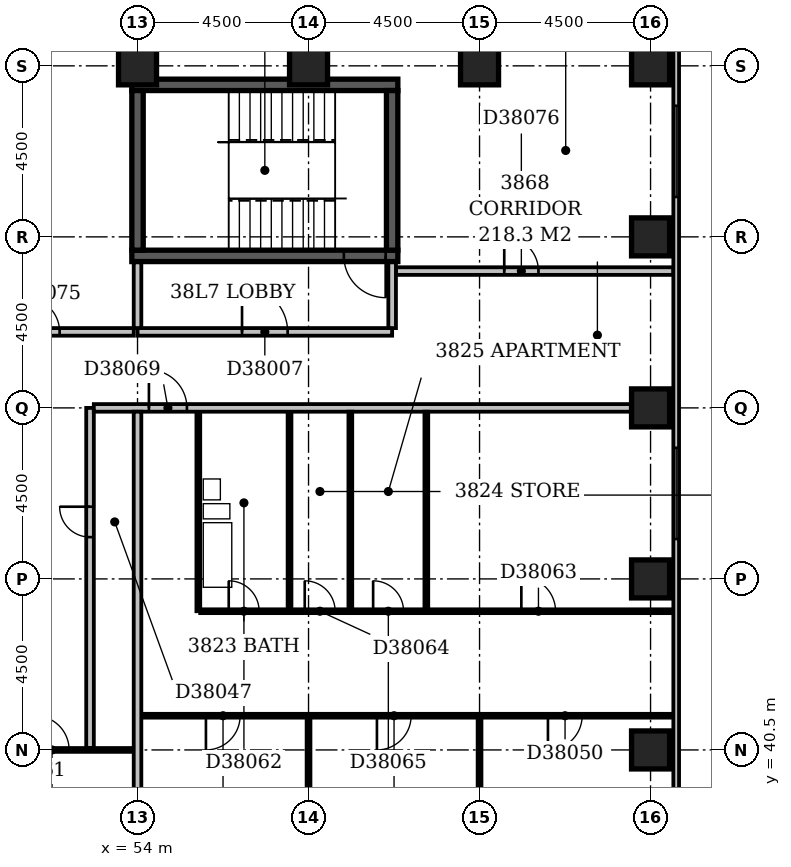
"""IFC4 building model, lengths in metres.
Left out: names, types, materials, properties, quantities, classifications, styles, units other than length and angle.
Written with IfcOpenShell. Run it as: python <this file> out.ifc"""

import sys

from ifc_helpers import new_model, si_unit, direction, frame, frame_2d, origin, origin_2d, place, context, subcontext, project, spatial, rectangle, extrude, element, fill, save


model = new_model("IFC4")
c1 = context("Model", 3, precision=1e-05, world=origin(), true_north=direction((0.0, 1.0)))
c2 = subcontext(c1, "Body", "Model", "MODEL_VIEW")
j1 = project(units=[si_unit("LENGTHUNIT", "METRE"), si_unit("PLANEANGLEUNIT", "RADIAN")], contexts=[c1])
p1 = place(None, origin())
s1 = spatial("IfcSite", under=j1, at=p1, CompositionType="ELEMENT")
p2 = place(p1, origin())
s2 = spatial("IfcBuilding", under=s1, at=p2, CompositionType="ELEMENT")
p3 = place(p2, frame((0.0, 0.0, 152.0)))
s3 = spatial("IfcBuildingStorey", under=s2, at=p3, CompositionType="ELEMENT", Elevation=152.0)
p4 = place(p3, frame((53.85, 53.5, -0.3), z_axis=(0.0, 0.0, 1.0), x_axis=(1.0, 0.0, 0.0)))
e1 = element("IfcWall", 1, at=p4, inside=s3, PredefinedType="SHEAR", context=c2, shape_type="SweptSolid", body=[
    extrude(rectangle(XDim=7.0, YDim=0.3, at=frame_2d((3.5, 0.0))), origin(), (0.0, 0.0, 1.0), 3.6),
])
p5 = place(p4, frame((5.58, 0.0, 0.3)))
e2 = element("IfcOpeningElement", 2, at=p5, cuts=e1, PredefinedType="OPENING", context=c2, shape_type="SweptSolid", body=[
    extrude(rectangle(XDim=1.1, YDim=2.1, at=frame_2d((0.55, 1.05))), frame((0.0, 0.162, 0.0), z_axis=(0.0, -1.0, 0.0), x_axis=(1.0, 0.0, 0.0)), (0.0, 0.0, 1.0), 0.324),
])
p6 = place(p3, frame((53.85, 58.0, -0.3), z_axis=(0.0, 0.0, 1.0), x_axis=(1.0, 0.0, 0.0)))
e3 = element("IfcWall", 3, at=p6, inside=s3, PredefinedType="SHEAR", context=c2, shape_type="SweptSolid", body=[
    extrude(rectangle(XDim=7.0, YDim=0.3, at=frame_2d((3.5, 0.0))), origin(), (0.0, 0.0, 1.0), 3.6),
])
for number, where, z_axis, x_axis in (
    (4, (54.0, 53.65, -0.3), (0.0, 0.0, 1.0), (0.0, 1.0, 0.0)),
    (5, (60.7, 53.65, -0.3), (0.0, 0.0, 1.0), (0.0, 1.0, 0.0)),
):
    element("IfcWall", number, at=place(p3, frame(where, z_axis=z_axis, x_axis=x_axis)), inside=s3, PredefinedType="SHEAR", context=c2, shape_type="SweptSolid", body=[
        extrude(rectangle(XDim=4.2, YDim=0.3, at=frame_2d((2.1, 0.0))), origin(), (0.0, 0.0, 1.0), 3.6),
    ])
for number, where, z_axis, x_axis in (
    (6, (67.5, 40.5, -0.3), (0.0, 0.0, 1.0), (1.0, 0.0, 0.0)),
    (7, (67.5, 45.0, -0.3), (0.0, 0.0, 1.0), (1.0, 0.0, 0.0)),
    (8, (67.5, 49.5, -0.3), (0.0, 0.0, 1.0), (1.0, 0.0, 0.0)),
    (9, (67.5, 54.0, -0.3), (0.0, 0.0, 1.0), (1.0, 0.0, 0.0)),
    (10, (54.0, 58.5, -0.3), (0.0, 0.0, 1.0), (1.0, 0.0, 0.0)),
    (11, (58.5, 58.5, -0.3), (0.0, 0.0, 1.0), (1.0, 0.0, 0.0)),
    (12, (63.0, 58.5, -0.3), (0.0, 0.0, 1.0), (1.0, 0.0, 0.0)),
    (13, (67.5, 58.5, -0.3), (0.0, 0.0, 1.0), (1.0, 0.0, 0.0)),
):
    element("IfcColumn", number, at=place(p3, frame(where, z_axis=z_axis, x_axis=x_axis)), inside=s3, PredefinedType="COLUMN", context=c2, shape_type="SweptSolid", body=[
        extrude(rectangle(XDim=1.0, YDim=1.0, at=origin_2d()), origin(), (0.0, 0.0, 1.0), 3.6),
    ])
p7 = place(p3, frame((68.175, 35.4, 0.0), z_axis=(0.0, 0.0, 1.0), x_axis=(0.0, 1.0, 0.0)))
e14 = element("IfcWall", 14, at=p7, inside=s3, PredefinedType="STANDARD", context=c2, shape_type="SweptSolid", body=[
    extrude(rectangle(XDim=23.85, YDim=0.15, at=frame_2d((11.925, 0.0))), origin(), (0.0, 0.0, 1.0), 2.7),
])
p8 = place(p7, frame((1.65, 0.0, 0.6)))
e15 = element("IfcOpeningElement", 15, at=p8, cuts=e14, PredefinedType="OPENING", context=c2, shape_type="SweptSolid", body=[
    extrude(rectangle(XDim=2.4, YDim=1.8, at=frame_2d((1.2, 0.9))), frame((0.0, 0.087, 0.0), z_axis=(0.0, -1.0, 0.0), x_axis=(1.0, 0.0, 0.0)), (0.0, 0.0, 1.0), 0.174),
])
p9 = place(p7, frame((10.65, 0.0, 0.6)))
e16 = element("IfcOpeningElement", 16, at=p9, cuts=e14, PredefinedType="OPENING", context=c2, shape_type="SweptSolid", body=[
    extrude(rectangle(XDim=2.4, YDim=1.8, at=frame_2d((1.2, 0.9))), frame((0.0, 0.087, 0.0), z_axis=(0.0, -1.0, 0.0), x_axis=(1.0, 0.0, 0.0)), (0.0, 0.0, 1.0), 0.174),
])
p10 = place(p7, frame((19.65, 0.0, 0.6)))
e17 = element("IfcOpeningElement", 17, at=p10, cuts=e14, PredefinedType="OPENING", context=c2, shape_type="SweptSolid", body=[
    extrude(rectangle(XDim=2.4, YDim=1.8, at=frame_2d((1.2, 0.9))), frame((0.0, 0.087, 0.0), z_axis=(0.0, -1.0, 0.0), x_axis=(1.0, 0.0, 0.0)), (0.0, 0.0, 1.0), 0.174),
])
p11 = place(p3, frame((54.0, 51.5, 0.0), z_axis=(0.0, 0.0, 1.0), x_axis=(1.0, 0.0, 0.0)))
e18 = element("IfcWall", 18, at=p11, inside=s3, PredefinedType="PARTITIONING", context=c2, shape_type="SweptSolid", body=[
    extrude(rectangle(XDim=6.7, YDim=0.2, at=frame_2d((3.35, 0.0))), origin(), (0.0, 0.0, 1.0), 3.3),
])
p12 = place(p11, frame((2.75, 0.0, 0.0)))
e19 = element("IfcOpeningElement", 19, at=p12, cuts=e18, PredefinedType="OPENING", context=c2, shape_type="SweptSolid", body=[
    extrude(rectangle(XDim=1.2, YDim=2.1, at=frame_2d((0.6, 1.05))), frame((0.0, 0.112, 0.0), z_axis=(0.0, -1.0, 0.0), x_axis=(1.0, 0.0, 0.0)), (0.0, 0.0, 1.0), 0.224),
])
p13 = place(p3, frame((60.7, 51.6, 0.0), z_axis=(0.0, 0.0, 1.0), x_axis=(0.0, 1.0, 0.0)))
e20 = element("IfcWall", 20, at=p13, inside=s3, PredefinedType="PARTITIONING", context=c2, shape_type="SweptSolid", body=[
    extrude(rectangle(XDim=1.73, YDim=0.2, at=frame_2d((0.865, 0.0))), origin(), (0.0, 0.0, 1.0), 3.3),
])
p14 = place(p3, frame((54.0, 51.6, 0.0), z_axis=(0.0, 0.0, 1.0), x_axis=(0.0, 1.0, 0.0)))
e21 = element("IfcWall", 21, at=p14, inside=s3, PredefinedType="PARTITIONING", context=c2, shape_type="SweptSolid", body=[
    extrude(rectangle(XDim=1.73, YDim=0.2, at=frame_2d((0.865, 0.0))), origin(), (0.0, 0.0, 1.0), 2.6),
])
p15 = place(p3, frame((54.0, 36.5, 0.0), z_axis=(0.0, 0.0, 1.0), x_axis=(0.0, 1.0, 0.0)))
e22 = element("IfcWall", 22, at=p15, inside=s3, PredefinedType="PARTITIONING", context=c2, shape_type="SweptSolid", body=[
    extrude(rectangle(XDim=12.9, YDim=0.2, at=frame_2d((6.45, 0.0))), origin(), (0.0, 0.0, 1.0), 2.6),
])
p16 = place(p3, frame((58.5, 36.5, 0.0), z_axis=(0.0, 0.0, 1.0), x_axis=(0.0, 1.0, 0.0)))
e23 = element("IfcWall", 23, at=p16, inside=s3, PredefinedType="PARTITIONING", context=c2, shape_type="SweptSolid", body=[
    extrude(rectangle(XDim=4.85, YDim=0.1, at=frame_2d((2.425, 0.0))), origin(), (0.0, 0.0, 1.0), 3.3),
])
p17 = place(p3, frame((63.0, 36.5, 0.0), z_axis=(0.0, 0.0, 1.0), x_axis=(0.0, 1.0, 0.0)))
e24 = element("IfcWall", 24, at=p17, inside=s3, PredefinedType="PARTITIONING", context=c2, shape_type="SweptSolid", body=[
    extrude(rectangle(XDim=4.85, YDim=0.1, at=frame_2d((2.425, 0.0))), origin(), (0.0, 0.0, 1.0), 2.4),
])
p18 = place(p3, frame((49.6, 40.5, 0.0), z_axis=(0.0, 0.0, 1.0), x_axis=(1.0, 0.0, 0.0)))
e25 = element("IfcWall", 25, at=p18, inside=s3, PredefinedType="PARTITIONING", context=c2, shape_type="SweptSolid", body=[
    extrude(rectangle(XDim=4.3, YDim=0.1, at=frame_2d((2.15, 0.0))), origin(), (0.0, 0.0, 1.0), 3.3),
])
p19 = place(p18, frame((1.7, 0.0, 0.0)))
e26 = element("IfcOpeningElement", 26, at=p19, cuts=e25, PredefinedType="OPENING", context=c2, shape_type="SweptSolid", body=[
    extrude(rectangle(XDim=0.9, YDim=2.1, at=frame_2d((0.45, 1.05))), frame((0.0, 0.062, 0.0), z_axis=(0.0, -1.0, 0.0), x_axis=(1.0, 0.0, 0.0)), (0.0, 0.0, 1.0), 0.124),
])
p20 = place(p3, frame((52.75, 40.55, 0.0), z_axis=(0.0, 0.0, 1.0), x_axis=(0.0, 1.0, 0.0)))
e27 = element("IfcWall", 27, at=p20, inside=s3, PredefinedType="PARTITIONING", context=c2, shape_type="SweptSolid", body=[
    extrude(rectangle(XDim=8.95, YDim=0.2, at=frame_2d((4.475, 0.0))), origin(), (0.0, 0.0, 1.0), 3.3),
])
p21 = place(p20, frame((5.55, 0.0, 0.0)))
e28 = element("IfcOpeningElement", 28, at=p21, cuts=e27, PredefinedType="OPENING", context=c2, shape_type="SweptSolid", body=[
    extrude(rectangle(XDim=0.8, YDim=2.1, at=frame_2d((0.4, 1.05))), frame((0.0, 0.112, 0.0), z_axis=(0.0, -1.0, 0.0), x_axis=(1.0, 0.0, 0.0)), (0.0, 0.0, 1.0), 0.224),
])
p22 = place(p3, frame((54.1, 41.4, 0.0), z_axis=(0.0, 0.0, 1.0), x_axis=(1.0, 0.0, 0.0)))
e29 = element("IfcWall", 29, at=p22, inside=s3, PredefinedType="PARTITIONING", context=c2, shape_type="SweptSolid", body=[
    extrude(rectangle(XDim=14.0, YDim=0.1, at=frame_2d((7.0, 0.0))), origin(), (0.0, 0.0, 1.0), 3.3),
])
p23 = place(p22, frame((1.7, 0.0, 0.0)))
e30 = element("IfcOpeningElement", 30, at=p23, cuts=e29, PredefinedType="OPENING", context=c2, shape_type="SweptSolid", body=[
    extrude(rectangle(XDim=0.9, YDim=2.1, at=frame_2d((0.45, 1.05))), frame((0.0, 0.062, 0.0), z_axis=(0.0, -1.0, 0.0), x_axis=(1.0, 0.0, 0.0)), (0.0, 0.0, 1.0), 0.124),
])
p24 = place(p22, frame((6.2, 0.0, 0.0)))
e31 = element("IfcOpeningElement", 31, at=p24, cuts=e29, PredefinedType="OPENING", context=c2, shape_type="SweptSolid", body=[
    extrude(rectangle(XDim=0.9, YDim=2.1, at=frame_2d((0.45, 1.05))), frame((0.0, 0.062, 0.0), z_axis=(0.0, -1.0, 0.0), x_axis=(1.0, 0.0, 0.0)), (0.0, 0.0, 1.0), 0.124),
])
p25 = place(p22, frame((10.7, 0.0, 0.0)))
e32 = element("IfcOpeningElement", 32, at=p25, cuts=e29, PredefinedType="OPENING", context=c2, shape_type="SweptSolid", body=[
    extrude(rectangle(XDim=0.9, YDim=2.1, at=frame_2d((0.45, 1.05))), frame((0.0, 0.062, 0.0), z_axis=(0.0, -1.0, 0.0), x_axis=(1.0, 0.0, 0.0)), (0.0, 0.0, 1.0), 0.124),
])
p26 = place(p3, frame((55.6, 44.15, 0.0), z_axis=(0.0, 0.0, 1.0), x_axis=(0.0, 1.0, 0.0)))
e33 = element("IfcWall", 33, at=p26, inside=s3, PredefinedType="PLUMBINGWALL", context=c2, shape_type="SweptSolid", body=[
    extrude(rectangle(XDim=5.25, YDim=0.1, at=frame_2d((2.625, 0.0))), origin(), (0.0, 0.0, 1.0), 3.3),
])
p27 = place(p3, frame((55.65, 44.15, 0.0), z_axis=(0.0, 0.0, 1.0), x_axis=(1.0, 0.0, 0.0)))
e34 = element("IfcWall", 34, at=p27, inside=s3, PredefinedType="PARTITIONING", context=c2, shape_type="SweptSolid", body=[
    extrude(rectangle(XDim=12.45, YDim=0.1, at=frame_2d((6.225, 0.0))), origin(), (0.0, 0.0, 1.0), 3.3),
])
p28 = place(p27, frame((0.75, 0.0, 0.0)))
e35 = element("IfcOpeningElement", 35, at=p28, cuts=e34, PredefinedType="OPENING", context=c2, shape_type="SweptSolid", body=[
    extrude(rectangle(XDim=0.8, YDim=2.1, at=frame_2d((0.4, 1.05))), frame((0.0, 0.062, 0.0), z_axis=(0.0, -1.0, 0.0), x_axis=(1.0, 0.0, 0.0)), (0.0, 0.0, 1.0), 0.124),
])
p29 = place(p27, frame((8.45, 0.0, 0.0)))
e36 = element("IfcOpeningElement", 36, at=p29, cuts=e34, PredefinedType="OPENING", context=c2, shape_type="SweptSolid", body=[
    extrude(rectangle(XDim=0.9, YDim=2.1, at=frame_2d((0.45, 1.05))), frame((0.0, 0.062, 0.0), z_axis=(0.0, -1.0, 0.0), x_axis=(1.0, 0.0, 0.0)), (0.0, 0.0, 1.0), 0.124),
])
p30 = place(p27, frame((2.75, 0.0, 0.0)))
e37 = element("IfcOpeningElement", 37, at=p30, cuts=e34, PredefinedType="OPENING", context=c2, shape_type="SweptSolid", body=[
    extrude(rectangle(XDim=0.8, YDim=2.1, at=frame_2d((0.4, 1.05))), frame((0.0, 0.062, 0.0), z_axis=(0.0, -1.0, 0.0), x_axis=(1.0, 0.0, 0.0)), (0.0, 0.0, 1.0), 0.124),
])
p31 = place(p27, frame((4.55, 0.0, 0.0)))
e38 = element("IfcOpeningElement", 38, at=p31, cuts=e34, PredefinedType="OPENING", context=c2, shape_type="SweptSolid", body=[
    extrude(rectangle(XDim=0.8, YDim=2.1, at=frame_2d((0.4, 1.05))), frame((0.0, 0.062, 0.0), z_axis=(0.0, -1.0, 0.0), x_axis=(1.0, 0.0, 0.0)), (0.0, 0.0, 1.0), 0.124),
])
p32 = place(p3, frame((58.0, 44.2, 0.0), z_axis=(0.0, 0.0, 1.0), x_axis=(0.0, 1.0, 0.0)))
e39 = element("IfcWall", 39, at=p32, inside=s3, PredefinedType="PLUMBINGWALL", context=c2, shape_type="SweptSolid", body=[
    extrude(rectangle(XDim=5.2, YDim=0.1, at=frame_2d((2.6, 0.0))), origin(), (0.0, 0.0, 1.0), 3.3),
])
for number, where, z_axis, x_axis in (
    (40, (59.6, 44.2, 0.0), (0.0, 0.0, 1.0), (0.0, 1.0, 0.0)),
    (41, (61.6, 44.2, 0.0), (0.0, 0.0, 1.0), (0.0, 1.0, 0.0)),
):
    element("IfcWall", number, at=place(p3, frame(where, z_axis=z_axis, x_axis=x_axis)), inside=s3, PredefinedType="PARTITIONING", context=c2, shape_type="SweptSolid", body=[
        extrude(rectangle(XDim=5.2, YDim=0.1, at=frame_2d((2.6, 0.0))), origin(), (0.0, 0.0, 1.0), 3.3),
    ])
p33 = place(p3, frame((52.85, 49.5, 0.0), z_axis=(0.0, 0.0, 1.0), x_axis=(1.0, 0.0, 0.0)))
e42 = element("IfcWall", 42, at=p33, inside=s3, PredefinedType="PARTITIONING", context=c2, shape_type="SweptSolid", body=[
    extrude(rectangle(XDim=14.15, YDim=0.2, at=frame_2d((7.075, 0.0))), origin(), (0.0, 0.0, 1.0), 3.3),
])
p34 = place(p33, frame((1.45, 0.0, 0.0)))
e43 = element("IfcOpeningElement", 43, at=p34, cuts=e42, PredefinedType="OPENING", context=c2, shape_type="SweptSolid", body=[
    extrude(rectangle(XDim=1.0, YDim=2.1, at=frame_2d((0.5, 1.05))), frame((0.0, 0.112, 0.0), z_axis=(0.0, -1.0, 0.0), x_axis=(1.0, 0.0, 0.0)), (0.0, 0.0, 1.0), 0.224),
])
p35 = place(p3, frame((44.1, 51.5, 0.0), z_axis=(0.0, 0.0, 1.0), x_axis=(1.0, 0.0, 0.0)))
e44 = element("IfcWall", 44, at=p35, inside=s3, PredefinedType="PARTITIONING", context=c2, shape_type="SweptSolid", body=[
    extrude(rectangle(XDim=9.8, YDim=0.2, at=frame_2d((4.9, 0.0))), origin(), (0.0, 0.0, 1.0), 3.3),
])
p36 = place(p35, frame((1.9, 0.0, 0.0)))
e45 = element("IfcOpeningElement", 45, at=p36, cuts=e44, PredefinedType="OPENING", context=c2, shape_type="SweptSolid", body=[
    extrude(rectangle(XDim=1.0, YDim=2.1, at=frame_2d((0.5, 1.05))), frame((0.0, 0.112, 0.0), z_axis=(0.0, -1.0, 0.0), x_axis=(1.0, 0.0, 0.0)), (0.0, 0.0, 1.0), 0.224),
])
p37 = place(p35, frame((6.95, 0.0, 0.0)))
e46 = element("IfcOpeningElement", 46, at=p37, cuts=e44, PredefinedType="OPENING", context=c2, shape_type="SweptSolid", body=[
    extrude(rectangle(XDim=0.9, YDim=2.1, at=frame_2d((0.45, 1.05))), frame((0.0, 0.112, 0.0), z_axis=(0.0, -1.0, 0.0), x_axis=(1.0, 0.0, 0.0)), (0.0, 0.0, 1.0), 0.224),
])
p38 = place(p3, frame((60.8, 53.1, 0.0), z_axis=(0.0, 0.0, 1.0), x_axis=(1.0, 0.0, 0.0)))
e47 = element("IfcWall", 47, at=p38, inside=s3, PredefinedType="PARTITIONING", context=c2, shape_type="SweptSolid", body=[
    extrude(rectangle(XDim=7.3, YDim=0.2, at=frame_2d((3.65, 0.0))), origin(), (0.0, 0.0, 1.0), 3.3),
])
p39 = place(p38, frame((2.85, 0.0, 0.0)))
e48 = element("IfcOpeningElement", 48, at=p39, cuts=e47, PredefinedType="OPENING", context=c2, shape_type="SweptSolid", body=[
    extrude(rectangle(XDim=0.9, YDim=2.1, at=frame_2d((0.45, 1.05))), frame((0.0, 0.112, 0.0), z_axis=(0.0, -1.0, 0.0), x_axis=(1.0, 0.0, 0.0)), (0.0, 0.0, 1.0), 0.224),
])
p40 = place(p9, origin())
e49 = element("IfcWindow", 49, at=p40, inside=s3, PartitioningType="SINGLE_PANEL", PredefinedType="WINDOW", context=c2, shape_type="SweptSolid", body=[
    extrude(rectangle(XDim=2.4, YDim=1.8, at=frame_2d((1.2, 0.9))), frame((0.0, 0.03, 0.0), z_axis=(0.0, -1.0, 0.0), x_axis=(1.0, 0.0, 0.0)), (0.0, 0.0, 1.0), 0.06),
])
fill(e16, e49)
p41 = place(p10, origin())
e50 = element("IfcWindow", 50, at=p41, inside=s3, PartitioningType="SINGLE_PANEL", PredefinedType="WINDOW", context=c2, shape_type="SweptSolid", body=[
    extrude(rectangle(XDim=2.4, YDim=1.8, at=frame_2d((1.2, 0.9))), frame((0.0, 0.03, 0.0), z_axis=(0.0, -1.0, 0.0), x_axis=(1.0, 0.0, 0.0)), (0.0, 0.0, 1.0), 0.06),
])
fill(e17, e50)
p42 = place(p12, origin())
e51 = element("IfcDoor", 51, at=p42, inside=s3, OperationType="SINGLE_SWING_LEFT", PredefinedType="DOOR", context=c2, shape_type="SweptSolid", body=[
    extrude(rectangle(XDim=1.2, YDim=2.1, at=frame_2d((0.6, 1.05))), frame((0.0, 0.025, 0.0), z_axis=(0.0, -1.0, 0.0), x_axis=(1.0, 0.0, 0.0)), (0.0, 0.0, 1.0), 0.05),
])
fill(e19, e51)
p43 = place(p5, origin())
e52 = element("IfcDoor", 52, at=p43, inside=s3, OperationType="SINGLE_SWING_RIGHT", PredefinedType="DOOR", context=c2, shape_type="SweptSolid", body=[
    extrude(rectangle(XDim=1.1, YDim=2.1, at=frame_2d((0.55, 1.05))), frame((0.0, 0.025, 0.0), z_axis=(0.0, -1.0, 0.0), x_axis=(1.0, 0.0, 0.0)), (0.0, 0.0, 1.0), 0.05),
])
fill(e2, e52)
p44 = place(p19, origin())
e53 = element("IfcDoor", 53, at=p44, inside=s3, OperationType="SINGLE_SWING_LEFT", PredefinedType="DOOR", context=c2, shape_type="SweptSolid", body=[
    extrude(rectangle(XDim=0.9, YDim=2.1, at=frame_2d((0.45, 1.05))), frame((0.0, 0.025, 0.0), z_axis=(0.0, -1.0, 0.0), x_axis=(1.0, 0.0, 0.0)), (0.0, 0.0, 1.0), 0.05),
])
fill(e26, e53)
p45 = place(p21, frame((0.8, 0.0, 0.0), z_axis=(0.0, 0.0, 1.0), x_axis=(-1.0, 0.0, 0.0)))
e54 = element("IfcDoor", 54, at=p45, inside=s3, OperationType="SINGLE_SWING_LEFT", PredefinedType="DOOR", context=c2, shape_type="SweptSolid", body=[
    extrude(rectangle(XDim=0.8, YDim=2.1, at=frame_2d((0.4, 1.05))), frame((0.0, 0.025, 0.0), z_axis=(0.0, -1.0, 0.0), x_axis=(1.0, 0.0, 0.0)), (0.0, 0.0, 1.0), 0.05),
])
fill(e28, e54)
p46 = place(p23, frame((0.9, 0.0, 0.0), z_axis=(0.0, 0.0, 1.0), x_axis=(-1.0, 0.0, 0.0)))
e55 = element("IfcDoor", 55, at=p46, inside=s3, OperationType="SINGLE_SWING_RIGHT", PredefinedType="DOOR", context=c2, shape_type="SweptSolid", body=[
    extrude(rectangle(XDim=0.9, YDim=2.1, at=frame_2d((0.45, 1.05))), frame((0.0, 0.025, 0.0), z_axis=(0.0, -1.0, 0.0), x_axis=(1.0, 0.0, 0.0)), (0.0, 0.0, 1.0), 0.05),
])
fill(e30, e55)
p47 = place(p24, frame((0.9, 0.0, 0.0), z_axis=(0.0, 0.0, 1.0), x_axis=(-1.0, 0.0, 0.0)))
e56 = element("IfcDoor", 56, at=p47, inside=s3, OperationType="SINGLE_SWING_RIGHT", PredefinedType="DOOR", context=c2, shape_type="SweptSolid", body=[
    extrude(rectangle(XDim=0.9, YDim=2.1, at=frame_2d((0.45, 1.05))), frame((0.0, 0.025, 0.0), z_axis=(0.0, -1.0, 0.0), x_axis=(1.0, 0.0, 0.0)), (0.0, 0.0, 1.0), 0.05),
])
fill(e31, e56)
p48 = place(p25, frame((0.9, 0.0, 0.0), z_axis=(0.0, 0.0, 1.0), x_axis=(-1.0, 0.0, 0.0)))
e57 = element("IfcDoor", 57, at=p48, inside=s3, OperationType="SINGLE_SWING_RIGHT", PredefinedType="DOOR", context=c2, shape_type="SweptSolid", body=[
    extrude(rectangle(XDim=0.9, YDim=2.1, at=frame_2d((0.45, 1.05))), frame((0.0, 0.025, 0.0), z_axis=(0.0, -1.0, 0.0), x_axis=(1.0, 0.0, 0.0)), (0.0, 0.0, 1.0), 0.05),
])
fill(e32, e57)
p49 = place(p28, origin())
e58 = element("IfcDoor", 58, at=p49, inside=s3, OperationType="SINGLE_SWING_LEFT", PredefinedType="DOOR", context=c2, shape_type="SweptSolid", body=[
    extrude(rectangle(XDim=0.8, YDim=2.1, at=frame_2d((0.4, 1.05))), frame((0.0, 0.025, 0.0), z_axis=(0.0, -1.0, 0.0), x_axis=(1.0, 0.0, 0.0)), (0.0, 0.0, 1.0), 0.05),
])
fill(e35, e58)
p50 = place(p29, origin())
e59 = element("IfcDoor", 59, at=p50, inside=s3, OperationType="SINGLE_SWING_LEFT", PredefinedType="DOOR", context=c2, shape_type="SweptSolid", body=[
    extrude(rectangle(XDim=0.9, YDim=2.1, at=frame_2d((0.45, 1.05))), frame((0.0, 0.025, 0.0), z_axis=(0.0, -1.0, 0.0), x_axis=(1.0, 0.0, 0.0)), (0.0, 0.0, 1.0), 0.05),
])
fill(e36, e59)
p51 = place(p30, origin())
e60 = element("IfcDoor", 60, at=p51, inside=s3, OperationType="SINGLE_SWING_LEFT", PredefinedType="DOOR", context=c2, shape_type="SweptSolid", body=[
    extrude(rectangle(XDim=0.8, YDim=2.1, at=frame_2d((0.4, 1.05))), frame((0.0, 0.025, 0.0), z_axis=(0.0, -1.0, 0.0), x_axis=(1.0, 0.0, 0.0)), (0.0, 0.0, 1.0), 0.05),
])
fill(e37, e60)
p52 = place(p31, origin())
e61 = element("IfcDoor", 61, at=p52, inside=s3, OperationType="SINGLE_SWING_LEFT", PredefinedType="DOOR", context=c2, shape_type="SweptSolid", body=[
    extrude(rectangle(XDim=0.8, YDim=2.1, at=frame_2d((0.4, 1.05))), frame((0.0, 0.025, 0.0), z_axis=(0.0, -1.0, 0.0), x_axis=(1.0, 0.0, 0.0)), (0.0, 0.0, 1.0), 0.05),
])
fill(e38, e61)
p53 = place(p34, origin())
e62 = element("IfcDoor", 62, at=p53, inside=s3, OperationType="SINGLE_SWING_LEFT", PredefinedType="DOOR", context=c2, shape_type="SweptSolid", body=[
    extrude(rectangle(XDim=1.0, YDim=2.1, at=frame_2d((0.5, 1.05))), frame((0.0, 0.025, 0.0), z_axis=(0.0, -1.0, 0.0), x_axis=(1.0, 0.0, 0.0)), (0.0, 0.0, 1.0), 0.05),
])
fill(e43, e62)
p54 = place(p37, origin())
e63 = element("IfcDoor", 63, at=p54, inside=s3, OperationType="SINGLE_SWING_LEFT", PredefinedType="DOOR", context=c2, shape_type="SweptSolid", body=[
    extrude(rectangle(XDim=0.9, YDim=2.1, at=frame_2d((0.45, 1.05))), frame((0.0, 0.025, 0.0), z_axis=(0.0, -1.0, 0.0), x_axis=(1.0, 0.0, 0.0)), (0.0, 0.0, 1.0), 0.05),
])
fill(e46, e63)
p55 = place(p39, origin())
e64 = element("IfcDoor", 64, at=p55, inside=s3, OperationType="SINGLE_SWING_LEFT", PredefinedType="DOOR", context=c2, shape_type="SweptSolid", body=[
    extrude(rectangle(XDim=0.9, YDim=2.1, at=frame_2d((0.45, 1.05))), frame((0.0, 0.025, 0.0), z_axis=(0.0, -1.0, 0.0), x_axis=(1.0, 0.0, 0.0)), (0.0, 0.0, 1.0), 0.05),
])
fill(e48, e64)
save(model, sys.argv[1])
